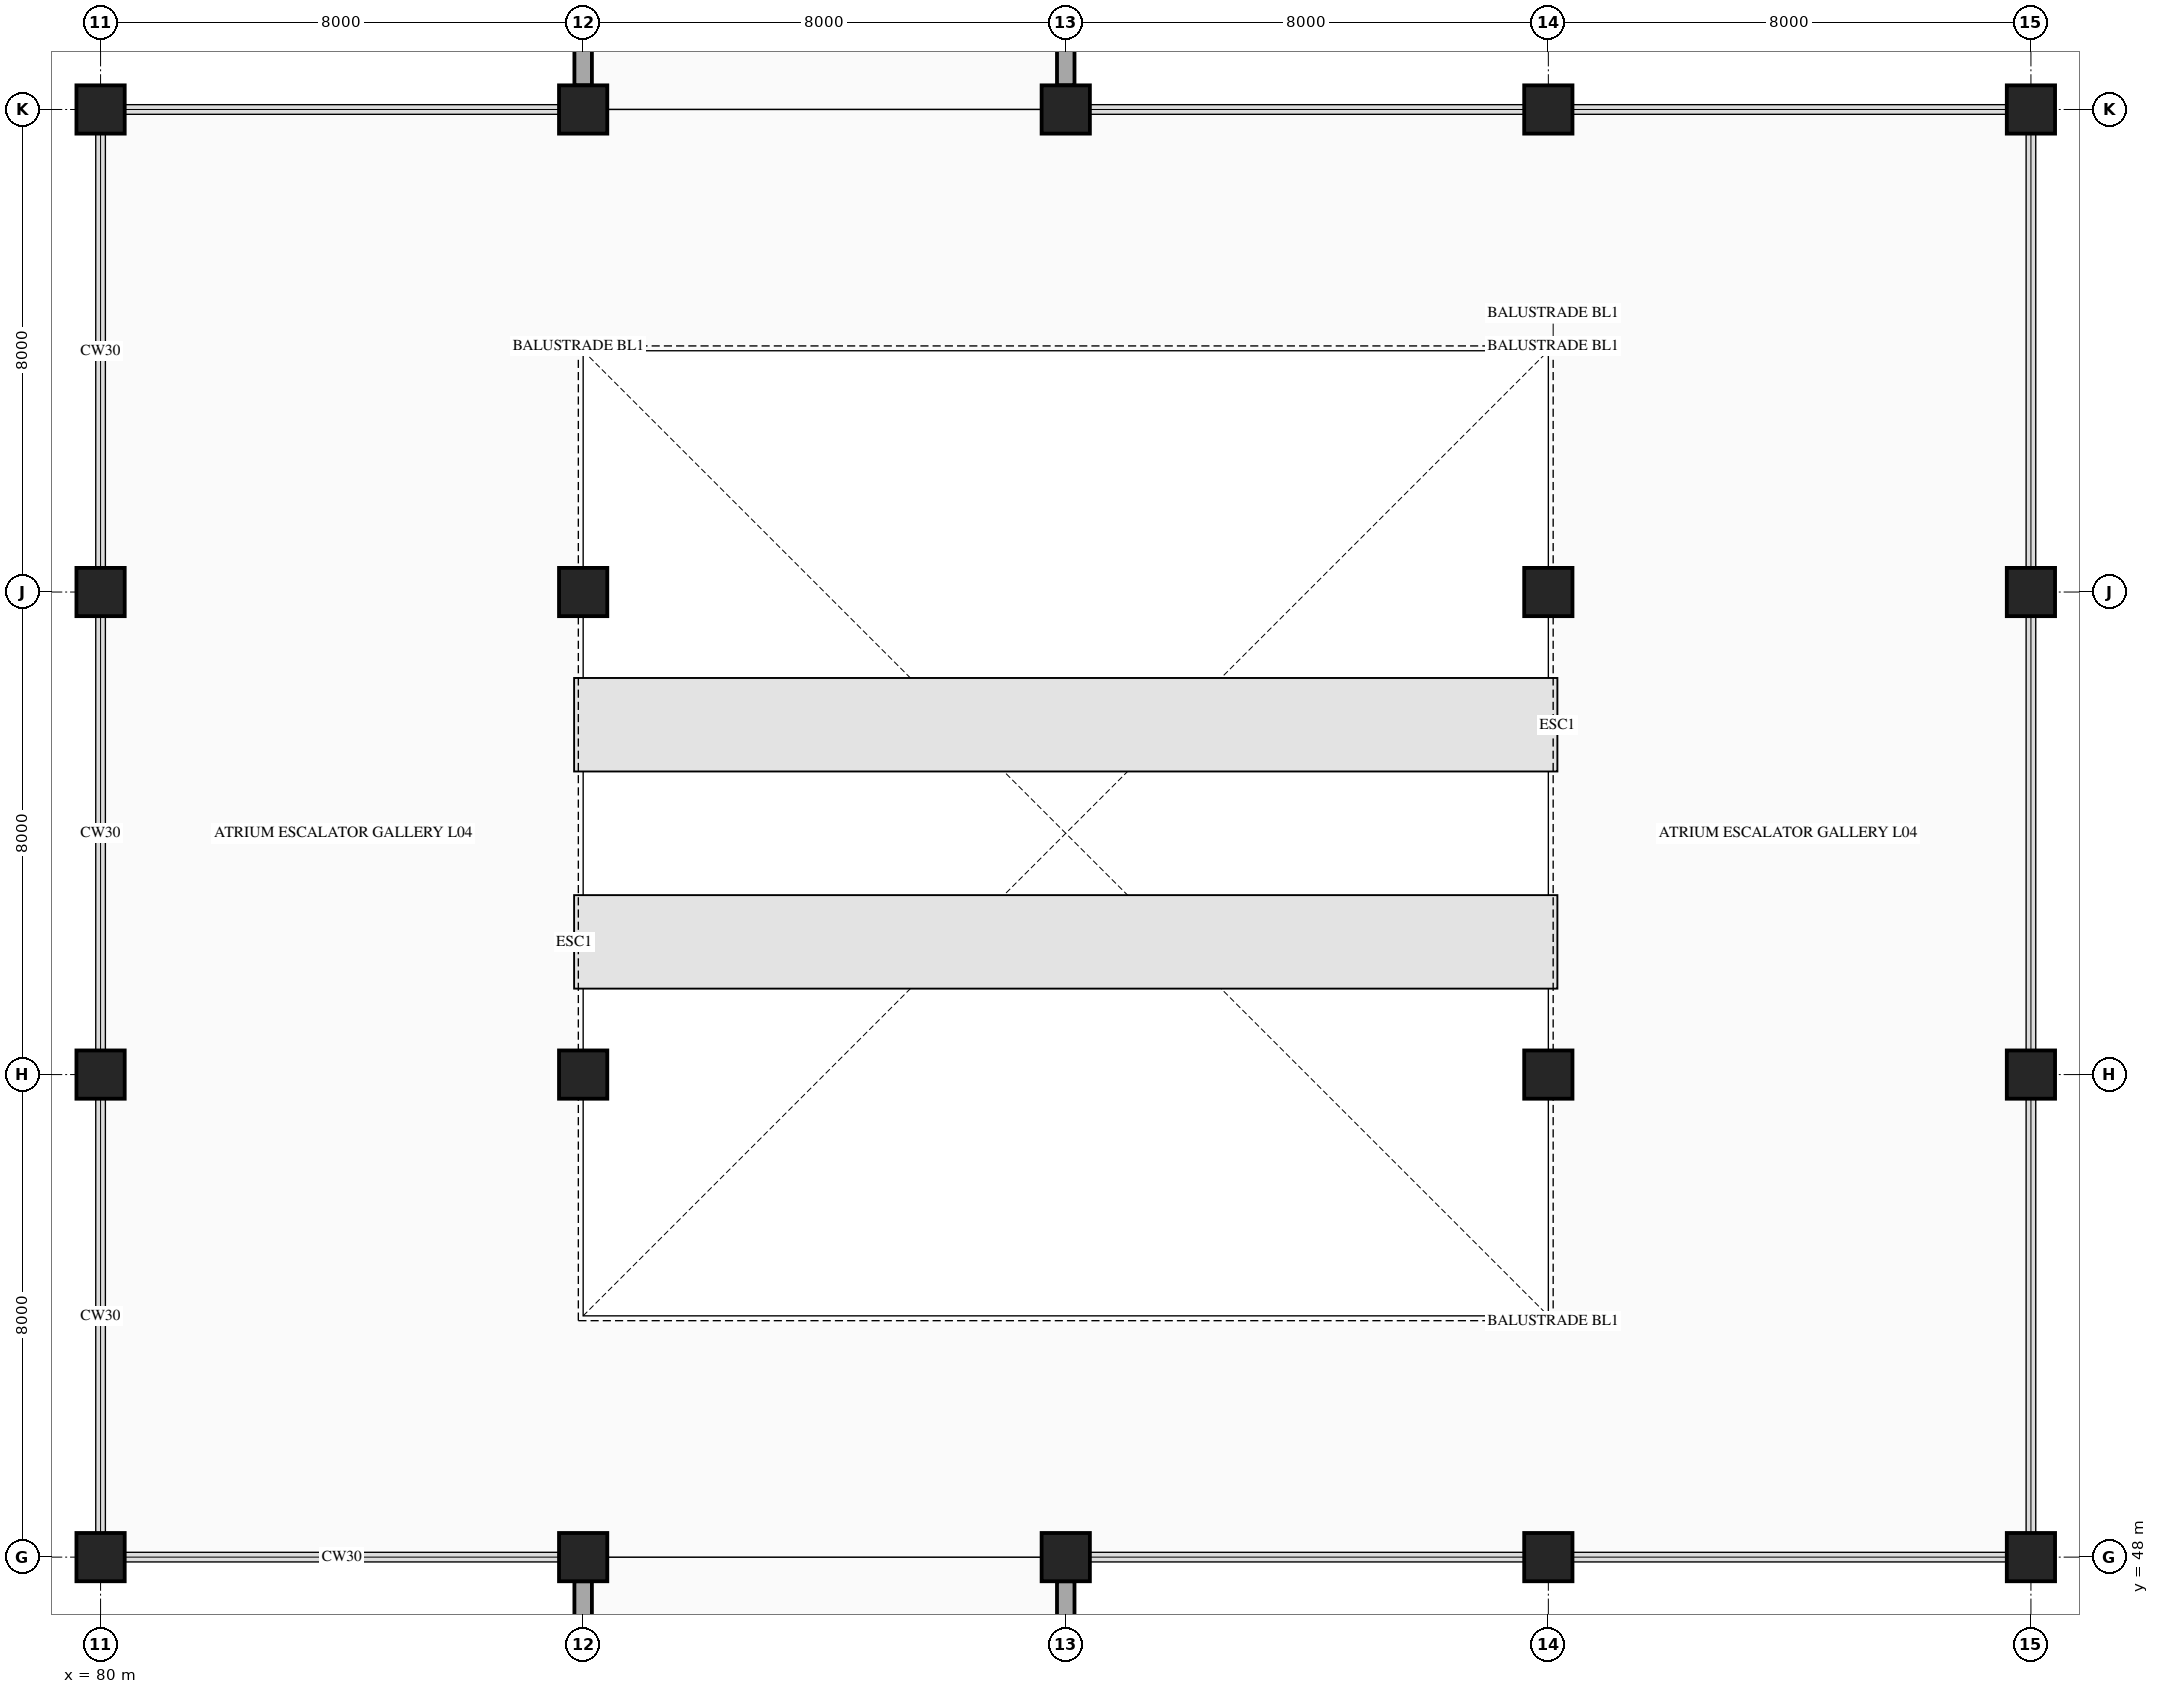
"""IFC4 building model, lengths in metres.
Left out: names, types, materials, properties, quantities, classifications, styles, units other than length and angle.
Written with IfcOpenShell. Run it as: python <this file> out.ifc"""

import sys

from ifc_helpers import new_model, si_unit, direction, frame, frame_2d, origin, origin_2d, place, context, subcontext, project, spatial, rectangle, circle, extrude, element, save


model = new_model("IFC4")
c1 = context("Model", 3, precision=1e-05, world=origin(), true_north=direction((0.0, 1.0)))
c2 = subcontext(c1, "Body", "Model", "MODEL_VIEW")
j1 = project(units=[si_unit("LENGTHUNIT", "METRE"), si_unit("PLANEANGLEUNIT", "RADIAN")], contexts=[c1])
p1 = place(None, origin())
s1 = spatial("IfcSite", under=j1, at=p1, CompositionType="ELEMENT")
p2 = place(p1, origin())
s2 = spatial("IfcBuilding", under=s1, at=p2, CompositionType="ELEMENT")
p3 = place(p2, frame((0.0, 0.0, 19.4)))
s3 = spatial("IfcBuildingStorey", under=s2, at=p3, CompositionType="ELEMENT", Elevation=19.4)
p4 = place(p3, frame((80.0, 48.0, 0.0), z_axis=(0.0, 0.0, 1.0), x_axis=(1.0, 0.0, 0.0)))
e1 = element("IfcColumn", 1, at=p4, inside=s3, PredefinedType="COLUMN", context=c2, shape_type="SweptSolid", body=[
    extrude(circle(Radius=0.4, at=origin_2d()), origin(), (0.0, 0.0, 1.0), 4.5),
])
p5 = place(p3, frame((80.0, 56.0, 0.0), z_axis=(0.0, 0.0, 1.0), x_axis=(1.0, 0.0, 0.0)))
e2 = element("IfcColumn", 2, at=p5, inside=s3, PredefinedType="COLUMN", context=c2, shape_type="SweptSolid", body=[
    extrude(rectangle(XDim=0.8, YDim=0.8, at=origin_2d()), origin(), (0.0, 0.0, 1.0), 4.5),
])
p6 = place(p3, frame((80.0, 64.0, 0.0), z_axis=(0.0, 0.0, 1.0), x_axis=(1.0, 0.0, 0.0)))
e3 = element("IfcColumn", 3, at=p6, inside=s3, PredefinedType="COLUMN", context=c2, shape_type="SweptSolid", body=[
    extrude(circle(Radius=0.4, at=origin_2d()), origin(), (0.0, 0.0, 1.0), 4.5),
])
for number, where, z_axis, x_axis in (
    (4, (80.0, 72.0, 0.0), (0.0, 0.0, 1.0), (1.0, 0.0, 0.0)),
    (5, (88.0, 48.0, 0.0), (0.0, 0.0, 1.0), (1.0, 0.0, 0.0)),
):
    element("IfcColumn", number, at=place(p3, frame(where, z_axis=z_axis, x_axis=x_axis)), inside=s3, PredefinedType="COLUMN", context=c2, shape_type="SweptSolid", body=[
        extrude(rectangle(XDim=0.8, YDim=0.8, at=origin_2d()), origin(), (0.0, 0.0, 1.0), 4.5),
    ])
p7 = place(p3, frame((88.0, 56.0, 0.0), z_axis=(0.0, 0.0, 1.0), x_axis=(1.0, 0.0, 0.0)))
e6 = element("IfcColumn", 6, at=p7, inside=s3, PredefinedType="COLUMN", context=c2, shape_type="SweptSolid", body=[
    extrude(circle(Radius=0.4, at=origin_2d()), origin(), (0.0, 0.0, 1.0), 4.5),
])
p8 = place(p3, frame((88.0, 64.0, 0.0), z_axis=(0.0, 0.0, 1.0), x_axis=(1.0, 0.0, 0.0)))
e7 = element("IfcColumn", 7, at=p8, inside=s3, PredefinedType="COLUMN", context=c2, shape_type="SweptSolid", body=[
    extrude(rectangle(XDim=0.8, YDim=0.8, at=origin_2d()), origin(), (0.0, 0.0, 1.0), 4.5),
])
for number, where, z_axis, x_axis in (
    (8, (88.0, 72.0, 0.0), (0.0, 0.0, 1.0), (1.0, 0.0, 0.0)),
    (9, (96.0, 48.0, 0.0), (0.0, 0.0, 1.0), (1.0, 0.0, 0.0)),
):
    element("IfcColumn", number, at=place(p3, frame(where, z_axis=z_axis, x_axis=x_axis)), inside=s3, PredefinedType="COLUMN", context=c2, shape_type="SweptSolid", body=[
        extrude(circle(Radius=0.4, at=origin_2d()), origin(), (0.0, 0.0, 1.0), 4.5),
    ])
for number, where, z_axis, x_axis in (
    (10, (96.0, 72.0, 0.0), (0.0, 0.0, 1.0), (1.0, 0.0, 0.0)),
    (11, (104.0, 48.0, 0.0), (0.0, 0.0, 1.0), (1.0, 0.0, 0.0)),
):
    element("IfcColumn", number, at=place(p3, frame(where, z_axis=z_axis, x_axis=x_axis)), inside=s3, PredefinedType="COLUMN", context=c2, shape_type="SweptSolid", body=[
        extrude(rectangle(XDim=0.8, YDim=0.8, at=origin_2d()), origin(), (0.0, 0.0, 1.0), 4.5),
    ])
p9 = place(p3, frame((104.0, 56.0, 0.0), z_axis=(0.0, 0.0, 1.0), x_axis=(1.0, 0.0, 0.0)))
e12 = element("IfcColumn", 12, at=p9, inside=s3, PredefinedType="COLUMN", context=c2, shape_type="SweptSolid", body=[
    extrude(circle(Radius=0.4, at=origin_2d()), origin(), (0.0, 0.0, 1.0), 4.5),
])
p10 = place(p3, frame((104.0, 64.0, 0.0), z_axis=(0.0, 0.0, 1.0), x_axis=(1.0, 0.0, 0.0)))
e13 = element("IfcColumn", 13, at=p10, inside=s3, PredefinedType="COLUMN", context=c2, shape_type="SweptSolid", body=[
    extrude(rectangle(XDim=0.8, YDim=0.8, at=origin_2d()), origin(), (0.0, 0.0, 1.0), 4.5),
])
for number, where, z_axis, x_axis in (
    (14, (104.0, 72.0, 0.0), (0.0, 0.0, 1.0), (1.0, 0.0, 0.0)),
    (15, (112.0, 48.0, 0.0), (0.0, 0.0, 1.0), (1.0, 0.0, 0.0)),
):
    element("IfcColumn", number, at=place(p3, frame(where, z_axis=z_axis, x_axis=x_axis)), inside=s3, PredefinedType="COLUMN", context=c2, shape_type="SweptSolid", body=[
        extrude(circle(Radius=0.4, at=origin_2d()), origin(), (0.0, 0.0, 1.0), 4.5),
    ])
p11 = place(p3, frame((112.0, 56.0, 0.0), z_axis=(0.0, 0.0, 1.0), x_axis=(1.0, 0.0, 0.0)))
e16 = element("IfcColumn", 16, at=p11, inside=s3, PredefinedType="COLUMN", context=c2, shape_type="SweptSolid", body=[
    extrude(rectangle(XDim=0.8, YDim=0.8, at=origin_2d()), origin(), (0.0, 0.0, 1.0), 4.5),
])
p12 = place(p3, frame((112.0, 64.0, 0.0), z_axis=(0.0, 0.0, 1.0), x_axis=(1.0, 0.0, 0.0)))
e17 = element("IfcColumn", 17, at=p12, inside=s3, PredefinedType="COLUMN", context=c2, shape_type="SweptSolid", body=[
    extrude(circle(Radius=0.4, at=origin_2d()), origin(), (0.0, 0.0, 1.0), 4.5),
])
p13 = place(p3, frame((112.0, 72.0, 0.0), z_axis=(0.0, 0.0, 1.0), x_axis=(1.0, 0.0, 0.0)))
e18 = element("IfcColumn", 18, at=p13, inside=s3, PredefinedType="COLUMN", context=c2, shape_type="SweptSolid", body=[
    extrude(rectangle(XDim=0.8, YDim=0.8, at=origin_2d()), origin(), (0.0, 0.0, 1.0), 4.5),
])
p14 = place(p3, frame((88.0, 40.375, 0.0), z_axis=(0.0, 0.0, 1.0), x_axis=(0.0, 1.0, 0.0)))
e19 = element("IfcWall", 19, at=p14, inside=s3, PredefinedType="STANDARD", context=c2, shape_type="SweptSolid", body=[
    extrude(rectangle(XDim=7.225, YDim=0.29, at=frame_2d((3.613, 0.0))), origin(), (0.0, 0.0, 1.0), 3.48),
])
p15 = place(p14, frame((2.588, 0.0, 0.8)))
e20 = element("IfcOpeningElement", 20, at=p15, cuts=e19, PredefinedType="OPENING", context=c2, shape_type="SweptSolid", body=[
    extrude(rectangle(XDim=2.05, YDim=1.95, at=frame_2d((1.025, 0.975))), frame((0.0, 0.155, 0.0), z_axis=(0.0, -1.0, 0.0), x_axis=(1.0, 0.0, 0.0)), (0.0, 0.0, 1.0), 0.31),
])
p16 = place(p3, frame((88.0, 72.4, 0.0), z_axis=(0.0, 0.0, 1.0), x_axis=(0.0, 1.0, 0.0)))
e21 = element("IfcWall", 21, at=p16, inside=s3, PredefinedType="STANDARD", context=c2, shape_type="SweptSolid", body=[
    extrude(rectangle(XDim=7.275, YDim=0.29, at=frame_2d((3.638, 0.0))), origin(), (0.0, 0.0, 1.0), 3.48),
])
p17 = place(p16, frame((2.612, 0.0, 0.8)))
e22 = element("IfcOpeningElement", 22, at=p17, cuts=e21, PredefinedType="OPENING", context=c2, shape_type="SweptSolid", body=[
    extrude(rectangle(XDim=2.05, YDim=1.95, at=frame_2d((1.025, 0.975))), frame((0.0, 0.155, 0.0), z_axis=(0.0, -1.0, 0.0), x_axis=(1.0, 0.0, 0.0)), (0.0, 0.0, 1.0), 0.31),
])
p18 = place(p3, frame((96.0, 79.675, 0.0), z_axis=(0.0, 0.0, 1.0), x_axis=(0.0, -1.0, 0.0)))
e23 = element("IfcWall", 23, at=p18, inside=s3, PredefinedType="STANDARD", context=c2, shape_type="SweptSolid", body=[
    extrude(rectangle(XDim=7.275, YDim=0.29, at=frame_2d((3.638, 0.0))), origin(), (0.0, 0.0, 1.0), 3.48),
])
p19 = place(p18, frame((2.612, 0.0, 0.8)))
e24 = element("IfcOpeningElement", 24, at=p19, cuts=e23, PredefinedType="OPENING", context=c2, shape_type="SweptSolid", body=[
    extrude(rectangle(XDim=2.05, YDim=1.95, at=frame_2d((1.025, 0.975))), frame((0.0, 0.155, 0.0), z_axis=(0.0, -1.0, 0.0), x_axis=(1.0, 0.0, 0.0)), (0.0, 0.0, 1.0), 0.31),
])
p20 = place(p3, frame((96.0, 47.6, 0.0), z_axis=(0.0, 0.0, 1.0), x_axis=(0.0, -1.0, 0.0)))
e25 = element("IfcWall", 25, at=p20, inside=s3, PredefinedType="STANDARD", context=c2, shape_type="SweptSolid", body=[
    extrude(rectangle(XDim=7.225, YDim=0.29, at=frame_2d((3.613, 0.0))), origin(), (0.0, 0.0, 1.0), 3.48),
])
p21 = place(p20, frame((2.588, 0.0, 0.8)))
e26 = element("IfcOpeningElement", 26, at=p21, cuts=e25, PredefinedType="OPENING", context=c2, shape_type="SweptSolid", body=[
    extrude(rectangle(XDim=2.05, YDim=1.95, at=frame_2d((1.025, 0.975))), frame((0.0, 0.155, 0.0), z_axis=(0.0, -1.0, 0.0), x_axis=(1.0, 0.0, 0.0)), (0.0, 0.0, 1.0), 0.31),
])
save(model, sys.argv[1])
